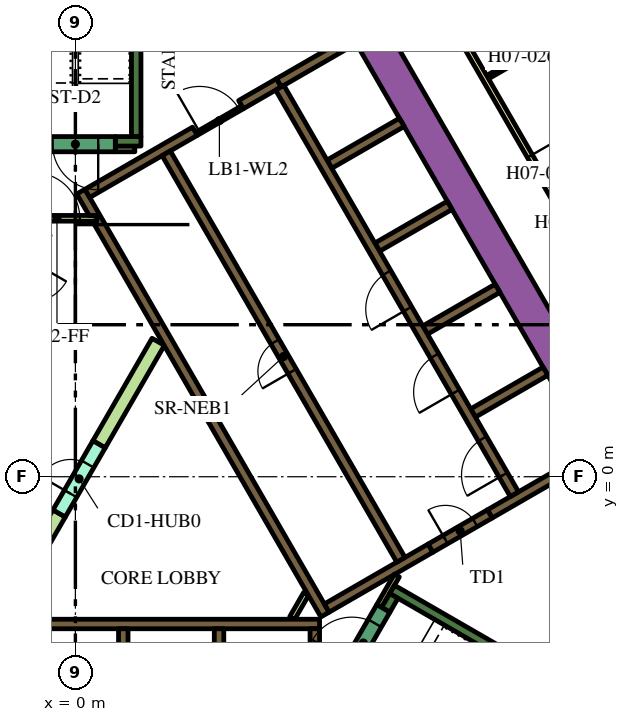
"""IFC4 building model, lengths in metres.
Left out: names, types, materials, properties, quantities, classifications, styles, units other than length and angle.
Written with IfcOpenShell. Run it as: python <this file> out.ifc"""

import sys

from ifc_helpers import new_model, si_unit, direction, frame, frame_2d, origin, place, context, subcontext, project, spatial, polyline, rectangle, outline, extrude, element, fill, save


model = new_model("IFC4")
c1 = context("Model", 3, precision=1e-05, world=origin(), true_north=direction((0.0, 1.0)))
c2 = subcontext(c1, "Body", "Model", "MODEL_VIEW")
j1 = project(units=[si_unit("LENGTHUNIT", "METRE"), si_unit("PLANEANGLEUNIT", "RADIAN")], contexts=[c1])
p1 = place(None, origin())
s1 = spatial("IfcSite", under=j1, at=p1, CompositionType="ELEMENT")
p2 = place(p1, origin())
s2 = spatial("IfcBuilding", under=s1, at=p2, CompositionType="ELEMENT")
p3 = place(p2, frame((0.0, 0.0, 103.2)))
s3 = spatial("IfcBuildingStorey", under=s2, at=p3, CompositionType="ELEMENT", Elevation=103.2)
p4 = place(p3, frame((6.711, 13.476, 0.0), z_axis=(0.0, 0.0, 1.0), x_axis=(0.500002723396, -0.866023831425, 0.0)))
e1 = element("IfcWall", 1, at=p4, inside=s3, PredefinedType="SOLIDWALL", context=c2, shape_type="SweptSolid", body=[
    extrude(rectangle(XDim=20.334, YDim=0.9, at=frame_2d((10.167, 0.0))), origin(), (0.0, 0.0, 1.0), 3.9),
])
p5 = place(p3, frame((11.695, -12.644, 0.0), z_axis=(0.0, 0.0, 1.0), x_axis=(0.500010229568, 0.86601949766, 0.0)))
e2 = element("IfcWall", 2, at=p5, inside=s3, PredefinedType="SOLIDWALL", context=c2, shape_type="SweptSolid", body=[
    extrude(rectangle(XDim=9.326, YDim=0.9, at=frame_2d((4.663, 0.0))), origin(), (0.0, 0.0, 1.0), 3.9),
])
p6 = place(p3, frame((8.334, -2.964, 0.0), z_axis=(0.0, 0.0, 1.0), x_axis=(0.866016039709, -0.500016218704, 0.0)))
e3 = element("IfcWall", 3, at=p6, inside=s3, PredefinedType="SOLIDWALL", context=c2, shape_type="SweptSolid", body=[
    extrude(rectangle(XDim=7.05, YDim=0.25, at=frame_2d((3.525, 0.0))), origin(), (0.0, 0.0, 1.0), 3.9),
])
p7 = place(p3, frame((8.168, -3.503, 0.0), z_axis=(0.0, 0.0, 1.0), x_axis=(0.49972245349, 0.866185586049, 0.0)))
e4 = element("IfcWall", 4, at=p7, inside=s3, PredefinedType="SOLIDWALL", context=c2, shape_type="SweptSolid", body=[
    extrude(rectangle(XDim=0.425, YDim=0.25, at=frame_2d((0.212, 0.0))), origin(), (0.0, 0.0, 1.0), 3.9),
])
p8 = place(p3, frame((1.6, 8.95, 0.0), z_axis=(0.0, 0.0, 1.0), x_axis=(0.0, 1.0, 0.0)))
e5 = element("IfcWall", 5, at=p8, inside=s3, PredefinedType="SOLIDWALL", context=c2, shape_type="SweptSolid", body=[
    extrude(rectangle(XDim=6.8, YDim=0.25, at=frame_2d((3.4, 0.0))), origin(), (0.0, 0.0, 1.0), 3.9),
])
p9 = place(p3, frame((1.05, 8.825, 0.0), z_axis=(0.0, 0.0, 1.0), x_axis=(1.0, 0.0, 0.0)))
e6 = element("IfcWall", 6, at=p9, inside=s3, PredefinedType="SOLIDWALL", context=c2, shape_type="SweptSolid", body=[
    extrude(rectangle(XDim=0.675, YDim=0.25, at=frame_2d((0.337, 0.0))), origin(), (0.0, 0.0, 1.0), 3.9),
])
p10 = place(p3, frame((-5.545, -3.875, 0.0), z_axis=(0.0, 0.0, 1.0), x_axis=(1.0, 0.0, 0.0)))
e7 = element("IfcWall", 7, at=p10, inside=s3, PredefinedType="SOLIDWALL", context=c2, shape_type="SweptSolid", body=[
    extrude(rectangle(XDim=11.97, YDim=0.25, at=frame_2d((5.985, 0.0))), origin(), (0.0, 0.0, 1.0), 3.9),
])
p11 = place(p3, frame((6.3, -7.268, 0.0), z_axis=(0.0, 0.0, 1.0), x_axis=(0.0, 1.0, 0.0)))
e8 = element("IfcWall", 8, at=p11, inside=s3, PredefinedType="SOLIDWALL", context=c2, shape_type="SweptSolid", body=[
    extrude(rectangle(XDim=3.268, YDim=0.25, at=frame_2d((1.634, 0.0))), origin(), (0.0, 0.0, 1.0), 3.9),
])
for number, where, z_axis, x_axis in (
    (9, (3.78, -4.0, 0.0), (0.0, 0.0, 1.0), (0.0, -1.0, 0.0)),
    (10, (1.26, -4.0, 0.0), (0.0, 0.0, 1.0), (0.0, -1.0, 0.0)),
    (11, (10.464, 1.677, 0.0), (0.0, 0.0, 1.0), (0.866, 0.5, 0.0)),
):
    element("IfcWall", number, at=place(p3, frame(where, z_axis=z_axis, x_axis=x_axis)), inside=s3, PredefinedType="SOLIDWALL", context=c2, shape_type="SweptSolid", body=[
        extrude(rectangle(XDim=2.2, YDim=0.25, at=frame_2d((1.1, 0.0))), origin(), (0.0, 0.0, 1.0), 3.9),
    ])
p12 = place(p3, frame((13.629, 0.594, 0.0), z_axis=(0.0, 0.0, 1.0), x_axis=(-0.86602790099, -0.499995674689, 0.0)))
e12 = element("IfcWall", 12, at=p12, inside=s3, PredefinedType="SOLIDWALL", context=c2, shape_type="SweptSolid", body=[
    extrude(rectangle(XDim=3.146, YDim=0.25, at=frame_2d((1.573, 0.0))), origin(), (0.0, 0.0, 1.0), 3.9),
])
p13 = place(p3, origin())
e13 = element("IfcWall", 13, at=p13, inside=s3, PredefinedType="SOLIDWALL", context=c2, shape_type="SweptSolid", body=[
    extrude(outline(polyline([(0.566, 6.725), (0.566, 6.875), (0.566, 6.875), (0.565, 6.875), (0.361, 6.875), (0.035, 7.439), (0.252, 7.564), (0.377, 7.348), (6.552, -3.348), (6.677, -3.564), (6.46, -3.689), (0.448, 6.725), (0.565, 6.725), (0.566, 6.725), (0.566, 6.725)])), origin(), (0.0, 0.0, 1.0), 3.9),
])
p14 = place(p3, frame((4.358, 9.791, 0.0), z_axis=(0.0, 0.0, 1.0), x_axis=(0.866079547155, 0.499906209203, 0.0)))
e14 = element("IfcWall", 14, at=p14, inside=s3, PredefinedType="SOLIDWALL", context=c2, shape_type="SweptSolid", body=[
    extrude(rectangle(XDim=1.15, YDim=0.25, at=frame_2d((0.575, 0.0))), origin(), (0.0, 0.0, 1.0), 3.9),
])
p15 = place(p3, frame((5.356, 10.367, 0.0), z_axis=(0.0, 0.0, 1.0), x_axis=(0.865978535641, 0.50008116922, 0.0)))
e15 = element("IfcWall", 15, at=p15, inside=s3, PredefinedType="SOLIDWALL", context=c2, shape_type="SweptSolid", body=[
    extrude(rectangle(XDim=2.278, YDim=0.25, at=frame_2d((1.139, 0.0))), origin(), (0.0, 0.0, 1.0), 3.9),
])
p16 = place(p3, frame((0.314, 7.456, 0.0), z_axis=(0.0, 0.0, 1.0), x_axis=(0.866013897511, 0.50001992892, 0.0)))
e16 = element("IfcWall", 16, at=p16, inside=s3, PredefinedType="SOLIDWALL", context=c2, shape_type="SweptSolid", body=[
    extrude(rectangle(XDim=3.268, YDim=0.25, at=frame_2d((1.634, 0.0))), origin(), (0.0, 0.0, 1.0), 3.9),
])
p17 = place(p3, frame((6.614, -3.456, 0.0), z_axis=(0.0, 0.0, 1.0), x_axis=(0.86602447079, 0.500001615989, 0.0)))
e17 = element("IfcWall", 17, at=p17, inside=s3, PredefinedType="SOLIDWALL", context=c2, shape_type="SweptSolid", body=[
    extrude(rectangle(XDim=3.154, YDim=0.25, at=frame_2d((1.577, 0.0))), origin(), (0.0, 0.0, 1.0), 3.9),
])
for number, where, z_axis, x_axis in (
    (18, (6.684, 8.224, 0.0), (0.0, 0.0, 1.0), (0.866, 0.5, 0.0)),
    (19, (7.944, 6.041, 0.0), (0.0, 0.0, 1.0), (0.866, 0.5, 0.0)),
    (20, (9.204, 3.859, 0.0), (0.0, 0.0, 1.0), (0.866, 0.5, 0.0)),
):
    element("IfcWall", number, at=place(p3, frame(where, z_axis=z_axis, x_axis=x_axis)), inside=s3, PredefinedType="SOLIDWALL", context=c2, shape_type="SweptSolid", body=[
        extrude(rectangle(XDim=2.2, YDim=0.25, at=frame_2d((1.1, 0.0))), origin(), (0.0, 0.0, 1.0), 3.9),
    ])
p18 = place(p3, frame((5.705, -3.718, 0.0), z_axis=(0.0, 0.0, 1.0), x_axis=(0.499962090823, 0.866047289552, 0.0)))
e21 = element("IfcWall", 21, at=p18, inside=s3, PredefinedType="PARTITIONING", context=c2, shape_type="SweptSolid", body=[
    extrude(rectangle(XDim=0.735, YDim=0.15, at=frame_2d((0.367, 0.0))), origin(), (0.0, 0.0, 1.0), 2.75),
])
p19 = place(p3, frame((8.459, -2.599, 0.0), z_axis=(0.0, 0.0, 1.0), x_axis=(-0.500041054325, -0.866001699761, 0.0)))
e22 = element("IfcWall", 22, at=p19, inside=s3, PredefinedType="PARTITIONING", context=c2, shape_type="SweptSolid", body=[
    extrude(rectangle(XDim=0.929, YDim=0.15, at=frame_2d((0.464, 0.0))), origin(), (0.0, 0.0, 1.0), 3.9),
])
e23 = element("IfcWall", 23, at=p13, inside=s3, PredefinedType="PARTITIONING", context=c2, shape_type="SweptSolid", body=[
    extrude(outline(polyline([(-0.59, -0.872), (-0.265, -1.059), (-1.822, -3.756), (-2.147, -3.568), (-0.59, -0.872)])), origin(), (0.0, 0.0, 1.0), 2.75),
])
e24 = element("IfcWall", 24, at=p13, inside=s3, PredefinedType="PARTITIONING", context=c2, shape_type="SweptSolid", body=[
    extrude(outline(polyline([(2.017, 3.643), (2.342, 3.456), (0.785, 0.76), (0.46, 0.947), (2.017, 3.643)])), origin(), (0.0, 0.0, 1.0), 2.75),
])
p20 = place(p3, frame((1.05, 8.625, 0.0), z_axis=(0.0, 0.0, 1.0), x_axis=(1.0, 0.0, 0.0)))
e25 = element("IfcWall", 25, at=p20, inside=s3, PredefinedType="PARTITIONING", context=c2, shape_type="SweptSolid", body=[
    extrude(rectangle(XDim=0.514, YDim=0.15, at=frame_2d((0.257, 0.0))), origin(), (0.0, 0.0, 1.0), 2.75),
])
p21 = place(p3, frame((11.553, -0.46, 0.0), z_axis=(0.0, 0.0, 1.0), x_axis=(-0.500006514828, 0.866021642414, 0.0)))
e26 = element("IfcWall", 26, at=p21, inside=s3, PredefinedType="SOLIDWALL", context=c2, shape_type="SweptSolid", body=[
    extrude(rectangle(XDim=12.35, YDim=0.25, at=frame_2d((6.175, 0.0))), origin(), (0.0, 0.0, 1.0), 3.9),
])
p22 = place(p21, frame((0.585, 0.0, 0.0)))
e27 = element("IfcOpeningElement", 27, at=p22, cuts=e26, PredefinedType="OPENING", context=c2, shape_type="SweptSolid", body=[
    extrude(rectangle(XDim=1.1, YDim=2.1, at=frame_2d((0.55, 1.05))), frame((0.0, 0.135, 0.0), z_axis=(0.0, -1.0, 0.0), x_axis=(1.0, 0.0, 0.0)), (0.0, 0.0, 1.0), 0.27),
])
p23 = place(p21, frame((3.105, 0.0, 0.0)))
e28 = element("IfcOpeningElement", 28, at=p23, cuts=e26, PredefinedType="OPENING", context=c2, shape_type="SweptSolid", body=[
    extrude(rectangle(XDim=1.1, YDim=2.1, at=frame_2d((0.55, 1.05))), frame((0.0, 0.135, 0.0), z_axis=(0.0, -1.0, 0.0), x_axis=(1.0, 0.0, 0.0)), (0.0, 0.0, 1.0), 0.27),
])
p24 = place(p21, frame((5.625, 0.0, 0.0)))
e29 = element("IfcOpeningElement", 29, at=p24, cuts=e26, PredefinedType="OPENING", context=c2, shape_type="SweptSolid", body=[
    extrude(rectangle(XDim=1.1, YDim=2.1, at=frame_2d((0.55, 1.05))), frame((0.0, 0.135, 0.0), z_axis=(0.0, -1.0, 0.0), x_axis=(1.0, 0.0, 0.0)), (0.0, 0.0, 1.0), 0.27),
])
p25 = place(p3, frame((8.565, -2.185, 0.0), z_axis=(0.0, 0.0, 1.0), x_axis=(-0.499997954832, 0.866026584559, 0.0)))
e30 = element("IfcWall", 30, at=p25, inside=s3, PredefinedType="SOLIDWALL", context=c2, shape_type="SweptSolid", body=[
    extrude(rectangle(XDim=12.35, YDim=0.25, at=frame_2d((6.175, 0.0))), origin(), (0.0, 0.0, 1.0), 3.9),
])
p26 = place(p25, frame((5.725, 0.0, 0.0)))
e31 = element("IfcOpeningElement", 31, at=p26, cuts=e30, PredefinedType="OPENING", context=c2, shape_type="SweptSolid", body=[
    extrude(rectangle(XDim=0.9, YDim=2.1, at=frame_2d((0.45, 1.05))), frame((0.0, 0.135, 0.0), z_axis=(0.0, -1.0, 0.0), x_axis=(1.0, 0.0, 0.0)), (0.0, 0.0, 1.0), 0.27),
])
p27 = place(p3, frame((7.053, -5.284, 0.0), z_axis=(0.0, 0.0, 1.0), x_axis=(0.500078061341, 0.865980330357, 0.0)))
e32 = element("IfcWall", 32, at=p27, inside=s3, PredefinedType="SOLIDWALL", context=c2, shape_type="SweptSolid", body=[
    extrude(rectangle(XDim=2.1, YDim=0.4, at=frame_2d((1.05, 0.0))), origin(), (0.0, 0.0, 1.0), 3.9),
])
p28 = place(p27, frame((0.45, 0.0, 0.0)))
e33 = element("IfcOpeningElement", 33, at=p28, cuts=e32, PredefinedType="OPENING", context=c2, shape_type="SweptSolid", body=[
    extrude(rectangle(XDim=1.2, YDim=2.1, at=frame_2d((0.6, 1.05))), frame((0.0, 0.21, 0.0), z_axis=(0.0, -1.0, 0.0), x_axis=(1.0, 0.0, 0.0)), (0.0, 0.0, 1.0), 0.42),
])
p29 = place(p3, frame((9.346, -1.879, 0.0), z_axis=(0.0, 0.0, 1.0), x_axis=(0.866047807691, 0.499961193289, 0.0)))
e34 = element("IfcWall", 34, at=p29, inside=s3, PredefinedType="SOLIDWALL", context=c2, shape_type="SweptSolid", body=[
    extrude(rectangle(XDim=1.8, YDim=0.25, at=frame_2d((0.9, 0.0))), origin(), (0.0, 0.0, 1.0), 3.9),
])
p30 = place(p29, frame((0.45, 0.0, 0.0)))
e35 = element("IfcOpeningElement", 35, at=p30, cuts=e34, PredefinedType="OPENING", context=c2, shape_type="SweptSolid", body=[
    extrude(rectangle(XDim=0.9, YDim=2.1, at=frame_2d((0.45, 1.05))), frame((0.0, 0.135, 0.0), z_axis=(0.0, -1.0, 0.0), x_axis=(1.0, 0.0, 0.0)), (0.0, 0.0, 1.0), 0.27),
])
p31 = place(p3, frame((1.05, 8.75, 0.0), z_axis=(0.0, 0.0, 1.0), x_axis=(-1.0, 0.0, 0.0)))
e36 = element("IfcWall", 36, at=p31, inside=s3, PredefinedType="SOLIDWALL", context=c2, shape_type="SweptSolid", body=[
    extrude(rectangle(XDim=2.1, YDim=0.4, at=frame_2d((1.05, 0.0))), origin(), (0.0, 0.0, 1.0), 3.9),
])
p32 = place(p31, frame((0.45, 0.0, 0.0)))
e37 = element("IfcOpeningElement", 37, at=p32, cuts=e36, PredefinedType="OPENING", context=c2, shape_type="SweptSolid", body=[
    extrude(rectangle(XDim=1.2, YDim=2.1, at=frame_2d((0.6, 1.05))), frame((0.0, 0.21, 0.0), z_axis=(0.0, -1.0, 0.0), x_axis=(1.0, 0.0, 0.0)), (0.0, 0.0, 1.0), 0.42),
])
p33 = place(p3, frame((-0.427, -0.966, 0.0), z_axis=(0.0, 0.0, 1.0), x_axis=(0.49994051562, 0.866059744384, 0.0)))
e38 = element("IfcWall", 38, at=p33, inside=s3, PredefinedType="PARTITIONING", context=c2, shape_type="SweptSolid", body=[
    extrude(rectangle(XDim=2.1, YDim=0.375, at=frame_2d((1.05, 0.0))), origin(), (0.0, 0.0, 1.0), 2.75),
])
p34 = place(p33, frame((0.6, 0.0, 0.0)))
e39 = element("IfcOpeningElement", 39, at=p34, cuts=e38, PredefinedType="OPENING", context=c2, shape_type="SweptSolid", body=[
    extrude(rectangle(XDim=0.9, YDim=2.1, at=frame_2d((0.45, 1.05))), frame((0.0, 0.198, 0.0), z_axis=(0.0, -1.0, 0.0), x_axis=(1.0, 0.0, 0.0)), (0.0, 0.0, 1.0), 0.395),
])
p35 = place(p3, frame((-1.534, 6.8, 0.0), z_axis=(0.0, 0.0, 1.0), x_axis=(1.0, 0.0, 0.0)))
e40 = element("IfcWall", 40, at=p35, inside=s3, PredefinedType="PARTITIONING", context=c2, shape_type="SweptSolid", body=[
    extrude(rectangle(XDim=2.1, YDim=0.15, at=frame_2d((1.05, 0.0))), origin(), (0.0, 0.0, 1.0), 2.75),
])
p36 = place(p35, frame((0.45, 0.0, 0.0)))
e41 = element("IfcOpeningElement", 41, at=p36, cuts=e40, PredefinedType="OPENING", context=c2, shape_type="SweptSolid", body=[
    extrude(rectangle(XDim=1.2, YDim=2.1, at=frame_2d((0.6, 1.05))), frame((0.0, 0.085, 0.0), z_axis=(0.0, -1.0, 0.0), x_axis=(1.0, 0.0, 0.0)), (0.0, 0.0, 1.0), 0.17),
])
p37 = place(p3, frame((3.183, 9.02, 0.0), z_axis=(0.0, 0.0, 1.0), x_axis=(0.866034573852, 0.49998411664, 0.0)))
e42 = element("IfcWall", 42, at=p37, inside=s3, PredefinedType="PARTITIONING", context=c2, shape_type="SweptSolid", body=[
    extrude(rectangle(XDim=1.4, YDim=0.09, at=frame_2d((0.7, 0.0))), origin(), (0.0, 0.0, 1.0), 2.75),
])
p38 = place(p37, frame((0.1, 0.0, 0.0)))
e43 = element("IfcOpeningElement", 43, at=p38, cuts=e42, PredefinedType="OPENING", context=c2, shape_type="SweptSolid", body=[
    extrude(rectangle(XDim=1.2, YDim=2.1, at=frame_2d((0.6, 1.05))), frame((0.0, 0.055, 0.0), z_axis=(0.0, -1.0, 0.0), x_axis=(1.0, 0.0, 0.0)), (0.0, 0.0, 1.0), 0.11),
])
p39 = place(p3, frame((6.163, 18.475, 0.0), z_axis=(0.0, 0.0, 1.0), x_axis=(0.500001317485, -0.866024643133, 0.0)))
e44 = element("IfcWall", 44, at=p39, inside=s3, PredefinedType="PARTITIONING", context=c2, shape_type="SweptSolid", body=[
    extrude(rectangle(XDim=25.767, YDim=0.15, at=frame_2d((12.883, 0.0))), origin(), (0.0, 0.0, 1.0), 2.75),
])
p40 = place(p39, frame((24.241, 0.0, 0.0)))
e45 = element("IfcOpeningElement", 45, at=p40, cuts=e44, PredefinedType="OPENING", context=c2, shape_type="SweptSolid", body=[
    extrude(rectangle(XDim=1.0, YDim=2.1, at=frame_2d((0.5, 1.05))), frame((0.0, 0.085, 0.0), z_axis=(0.0, -1.0, 0.0), x_axis=(1.0, 0.0, 0.0)), (0.0, 0.0, 1.0), 0.17),
])
p41 = place(p39, frame((13.144, 0.0, 0.0)))
e46 = element("IfcOpeningElement", 46, at=p41, cuts=e44, PredefinedType="OPENING", context=c2, shape_type="SweptSolid", body=[
    extrude(rectangle(XDim=1.0, YDim=2.1, at=frame_2d((0.5, 1.05))), frame((0.0, 0.085, 0.0), z_axis=(0.0, -1.0, 0.0), x_axis=(1.0, 0.0, 0.0)), (0.0, 0.0, 1.0), 0.17),
])
p42 = place(p39, frame((11.592, 0.0, 0.0)))
e47 = element("IfcOpeningElement", 47, at=p42, cuts=e44, PredefinedType="OPENING", context=c2, shape_type="SweptSolid", body=[
    extrude(rectangle(XDim=1.1, YDim=2.1, at=frame_2d((0.55, 1.05))), frame((0.0, 0.085, 0.0), z_axis=(0.0, -1.0, 0.0), x_axis=(1.0, 0.0, 0.0)), (0.0, 0.0, 1.0), 0.17),
])
p43 = place(p39, frame((4.674, 0.0, 0.0)))
e48 = element("IfcOpeningElement", 48, at=p43, cuts=e44, PredefinedType="OPENING", context=c2, shape_type="SweptSolid", body=[
    extrude(rectangle(XDim=0.9, YDim=2.1, at=frame_2d((0.45, 1.05))), frame((0.0, 0.085, 0.0), z_axis=(0.0, -1.0, 0.0), x_axis=(1.0, 0.0, 0.0)), (0.0, 0.0, 1.0), 0.17),
])
p44 = place(p39, frame((2.411, 0.0, 0.0)))
e49 = element("IfcOpeningElement", 49, at=p44, cuts=e44, PredefinedType="OPENING", context=c2, shape_type="SweptSolid", body=[
    extrude(rectangle(XDim=1.0, YDim=2.1, at=frame_2d((0.5, 1.05))), frame((0.0, 0.085, 0.0), z_axis=(0.0, -1.0, 0.0), x_axis=(1.0, 0.0, 0.0)), (0.0, 0.0, 1.0), 0.17),
])
p45 = place(p3, frame((10.847, 10.513, 0.0), z_axis=(0.0, 0.0, 1.0), x_axis=(0.865996816683, 0.500049511043, 0.0)))
e50 = element("IfcWall", 50, at=p45, inside=s3, PredefinedType="PARTITIONING", context=c2, shape_type="SweptSolid", body=[
    extrude(rectangle(XDim=2.8, YDim=0.1, at=frame_2d((1.4, 0.0))), origin(), (0.0, 0.0, 1.0), 2.75),
])
p46 = place(p45, frame((0.55, 0.0, 0.0)))
e51 = element("IfcOpeningElement", 51, at=p46, cuts=e50, PredefinedType="OPENING", context=c2, shape_type="SweptSolid", body=[
    extrude(rectangle(XDim=1.0, YDim=2.1, at=frame_2d((0.5, 1.05))), frame((0.0, 0.06, 0.0), z_axis=(0.0, -1.0, 0.0), x_axis=(1.0, 0.0, 0.0)), (0.0, 0.0, 1.0), 0.12),
])
p47 = place(p22, origin())
e52 = element("IfcDoor", 52, at=p47, inside=s3, OperationType="DOUBLE_DOOR_SLIDING", PredefinedType="DOOR", context=c2, shape_type="SweptSolid", body=[
    extrude(rectangle(XDim=1.1, YDim=2.1, at=frame_2d((0.55, 1.05))), frame((0.0, 0.025, 0.0), z_axis=(0.0, -1.0, 0.0), x_axis=(1.0, 0.0, 0.0)), (0.0, 0.0, 1.0), 0.05),
])
fill(e27, e52)
p48 = place(p23, origin())
e53 = element("IfcDoor", 53, at=p48, inside=s3, OperationType="DOUBLE_DOOR_SLIDING", PredefinedType="DOOR", context=c2, shape_type="SweptSolid", body=[
    extrude(rectangle(XDim=1.1, YDim=2.1, at=frame_2d((0.55, 1.05))), frame((0.0, 0.025, 0.0), z_axis=(0.0, -1.0, 0.0), x_axis=(1.0, 0.0, 0.0)), (0.0, 0.0, 1.0), 0.05),
])
fill(e28, e53)
p49 = place(p24, origin())
e54 = element("IfcDoor", 54, at=p49, inside=s3, OperationType="DOUBLE_DOOR_SLIDING", PredefinedType="DOOR", context=c2, shape_type="SweptSolid", body=[
    extrude(rectangle(XDim=1.1, YDim=2.1, at=frame_2d((0.55, 1.05))), frame((0.0, 0.025, 0.0), z_axis=(0.0, -1.0, 0.0), x_axis=(1.0, 0.0, 0.0)), (0.0, 0.0, 1.0), 0.05),
])
fill(e29, e54)
p50 = place(p26, origin())
e55 = element("IfcDoor", 55, at=p50, inside=s3, OperationType="SINGLE_SWING_LEFT", PredefinedType="DOOR", context=c2, shape_type="SweptSolid", body=[
    extrude(rectangle(XDim=0.9, YDim=2.1, at=frame_2d((0.45, 1.05))), frame((0.0, 0.025, 0.0), z_axis=(0.0, -1.0, 0.0), x_axis=(1.0, 0.0, 0.0)), (0.0, 0.0, 1.0), 0.05),
])
fill(e31, e55)
p51 = place(p28, origin())
e56 = element("IfcDoor", 56, at=p51, inside=s3, OperationType="SINGLE_SWING_LEFT", PredefinedType="DOOR", context=c2, shape_type="SweptSolid", body=[
    extrude(rectangle(XDim=1.2, YDim=2.1, at=frame_2d((0.6, 1.05))), frame((0.0, 0.025, 0.0), z_axis=(0.0, -1.0, 0.0), x_axis=(1.0, 0.0, 0.0)), (0.0, 0.0, 1.0), 0.05),
])
fill(e33, e56)
p52 = place(p30, origin())
e57 = element("IfcDoor", 57, at=p52, inside=s3, OperationType="SINGLE_SWING_LEFT", PredefinedType="DOOR", context=c2, shape_type="SweptSolid", body=[
    extrude(rectangle(XDim=0.9, YDim=2.1, at=frame_2d((0.45, 1.05))), frame((0.0, 0.025, 0.0), z_axis=(0.0, -1.0, 0.0), x_axis=(1.0, 0.0, 0.0)), (0.0, 0.0, 1.0), 0.05),
])
fill(e35, e57)
p53 = place(p32, origin())
e58 = element("IfcDoor", 58, at=p53, inside=s3, OperationType="SINGLE_SWING_LEFT", PredefinedType="DOOR", context=c2, shape_type="SweptSolid", body=[
    extrude(rectangle(XDim=1.2, YDim=2.1, at=frame_2d((0.6, 1.05))), frame((0.0, 0.025, 0.0), z_axis=(0.0, -1.0, 0.0), x_axis=(1.0, 0.0, 0.0)), (0.0, 0.0, 1.0), 0.05),
])
fill(e37, e58)
p54 = place(p34, origin())
e59 = element("IfcDoor", 59, at=p54, inside=s3, OperationType="SINGLE_SWING_LEFT", PredefinedType="DOOR", context=c2, shape_type="SweptSolid", body=[
    extrude(rectangle(XDim=0.9, YDim=2.1, at=frame_2d((0.45, 1.05))), frame((0.0, 0.025, 0.0), z_axis=(0.0, -1.0, 0.0), x_axis=(1.0, 0.0, 0.0)), (0.0, 0.0, 1.0), 0.05),
])
fill(e39, e59)
p55 = place(p36, origin())
e60 = element("IfcDoor", 60, at=p55, inside=s3, OperationType="SINGLE_SWING_LEFT", PredefinedType="DOOR", context=c2, shape_type="SweptSolid", body=[
    extrude(rectangle(XDim=1.2, YDim=2.1, at=frame_2d((0.6, 1.05))), frame((0.0, 0.025, 0.0), z_axis=(0.0, -1.0, 0.0), x_axis=(1.0, 0.0, 0.0)), (0.0, 0.0, 1.0), 0.05),
])
fill(e41, e60)
p56 = place(p38, origin())
e61 = element("IfcDoor", 61, at=p56, inside=s3, OperationType="SINGLE_SWING_LEFT", PredefinedType="DOOR", context=c2, shape_type="SweptSolid", body=[
    extrude(rectangle(XDim=1.2, YDim=2.1, at=frame_2d((0.6, 1.05))), frame((0.0, 0.025, 0.0), z_axis=(0.0, -1.0, 0.0), x_axis=(1.0, 0.0, 0.0)), (0.0, 0.0, 1.0), 0.05),
])
fill(e43, e61)
p57 = place(p42, origin())
e62 = element("IfcDoor", 62, at=p57, inside=s3, OperationType="SINGLE_SWING_RIGHT", PredefinedType="DOOR", context=c2, shape_type="SweptSolid", body=[
    extrude(rectangle(XDim=1.1, YDim=2.1, at=frame_2d((0.55, 1.05))), frame((0.0, 0.025, 0.0), z_axis=(0.0, -1.0, 0.0), x_axis=(1.0, 0.0, 0.0)), (0.0, 0.0, 1.0), 0.05),
])
fill(e47, e62)
p58 = place(p46, origin())
e63 = element("IfcDoor", 63, at=p58, inside=s3, OperationType="SINGLE_SWING_LEFT", PredefinedType="DOOR", context=c2, shape_type="SweptSolid", body=[
    extrude(rectangle(XDim=1.0, YDim=2.1, at=frame_2d((0.5, 1.05))), frame((0.0, 0.025, 0.0), z_axis=(0.0, -1.0, 0.0), x_axis=(1.0, 0.0, 0.0)), (0.0, 0.0, 1.0), 0.05),
])
fill(e51, e63)
save(model, sys.argv[1])
